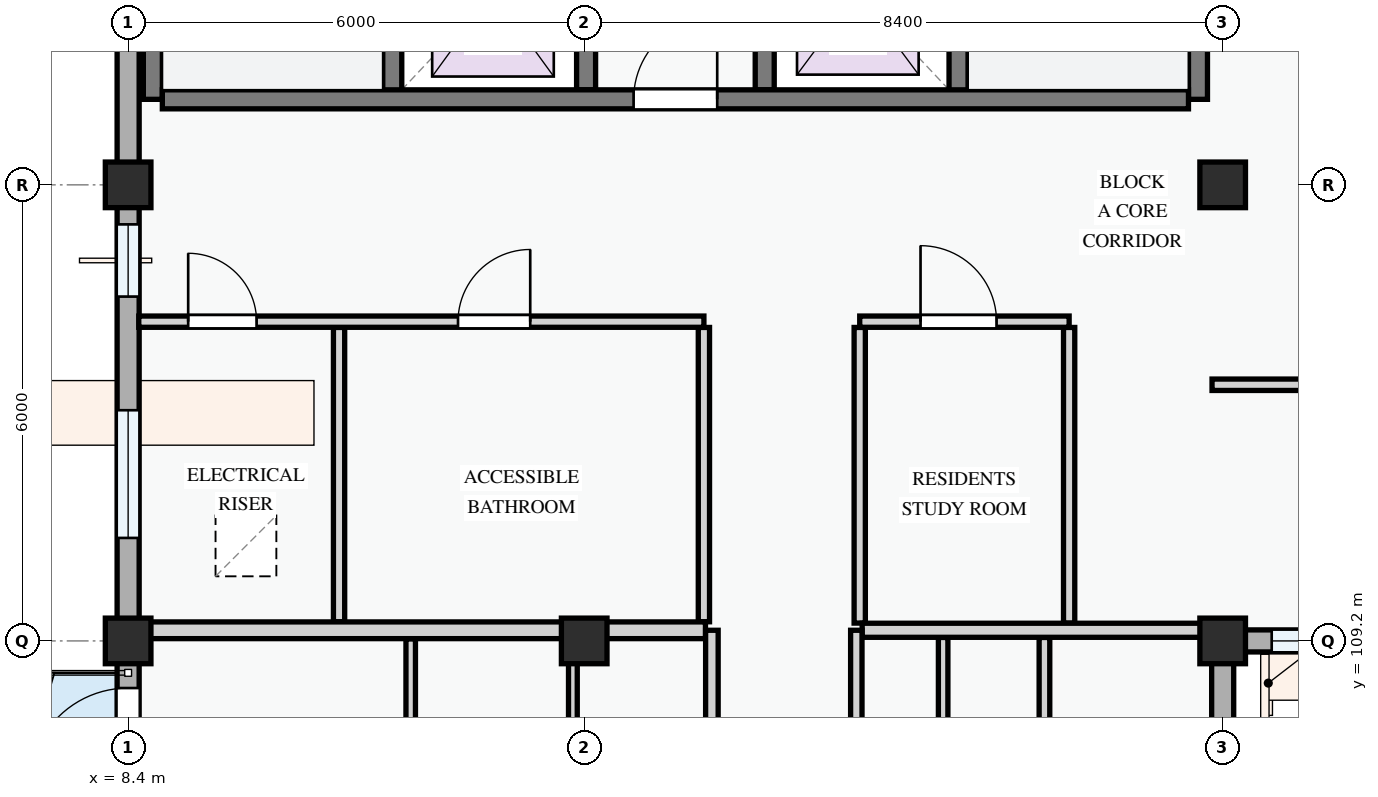
"""IFC4 building model, lengths in metres.
Left out: names, types, materials, properties, quantities, classifications, styles, units other than length and angle.
Written with IfcOpenShell. Run it as: python <this file> out.ifc"""

import sys

from ifc_helpers import new_model, si_unit, direction, frame, frame_2d, origin, origin_2d, place, context, subcontext, project, spatial, rectangle, extrude, element, fill, save


model = new_model("IFC4")
c1 = context("Model", 3, precision=1e-05, world=origin(), true_north=direction((0.0, 1.0)))
c2 = subcontext(c1, "Body", "Model", "MODEL_VIEW")
j1 = project(units=[si_unit("LENGTHUNIT", "METRE"), si_unit("PLANEANGLEUNIT", "RADIAN")], contexts=[c1])
p1 = place(None, origin())
s1 = spatial("IfcSite", under=j1, at=p1, CompositionType="ELEMENT")
p2 = place(p1, origin())
s2 = spatial("IfcBuilding", under=s1, at=p2, CompositionType="ELEMENT")
p3 = place(p2, frame((0.0, 0.0, 27.9)))
s3 = spatial("IfcBuildingStorey", under=s2, at=p3, CompositionType="ELEMENT", Elevation=27.9)
for number, where, z_axis, x_axis in (
    (1, (8.4, 109.2, 0.0), (0.0, 0.0, 1.0), (1.0, 0.0, 0.0)),
    (2, (8.4, 115.2, 0.0), (0.0, 0.0, 1.0), (1.0, 0.0, 0.0)),
    (3, (14.4, 109.2, 0.0), (0.0, 0.0, 1.0), (1.0, 0.0, 0.0)),
    (4, (22.8, 109.2, 0.0), (0.0, 0.0, 1.0), (1.0, 0.0, 0.0)),
    (5, (22.8, 115.2, 0.0), (0.0, 0.0, 1.0), (1.0, 0.0, 0.0)),
):
    element("IfcColumn", number, at=place(p3, frame(where, z_axis=z_axis, x_axis=x_axis)), inside=s3, PredefinedType="COLUMN", context=c2, shape_type="SweptSolid", body=[
        extrude(rectangle(XDim=0.6, YDim=0.6, at=origin_2d()), origin(), (0.0, 0.0, 1.0), 3.3),
    ])
p4 = place(p3, frame((22.8, 109.2, 0.0), z_axis=(0.0, 0.0, 1.0), x_axis=(1.0, 0.0, 0.0)))
e6 = element("IfcWall", 6, at=p4, inside=s3, PredefinedType="STANDARD", context=c2, shape_type="SweptSolid", body=[
    extrude(rectangle(XDim=6.0, YDim=0.29, at=frame_2d((3.0, 0.0))), origin(), (0.0, 0.0, 1.0), 2.475),
])
p5 = place(p4, frame((0.645, 0.0, 0.78)))
e7 = element("IfcOpeningElement", 7, at=p5, cuts=e6, PredefinedType="OPENING", context=c2, shape_type="SweptSolid", body=[
    extrude(rectangle(XDim=1.25, YDim=1.45, at=frame_2d((0.625, 0.725))), frame((0.0, 0.155, 0.0), z_axis=(0.0, -1.0, 0.0), x_axis=(1.0, 0.0, 0.0)), (0.0, 0.0, 1.0), 0.31),
])
p6 = place(p4, frame((2.905, 0.0, 0.78)))
e8 = element("IfcOpeningElement", 8, at=p6, cuts=e6, PredefinedType="OPENING", context=c2, shape_type="SweptSolid", body=[
    extrude(rectangle(XDim=2.35, YDim=1.55, at=frame_2d((1.175, 0.775))), frame((0.0, 0.155, 0.0), z_axis=(0.0, -1.0, 0.0), x_axis=(1.0, 0.0, 0.0)), (0.0, 0.0, 1.0), 0.31),
])
p7 = place(p3, frame((8.4, 123.6, 0.0), z_axis=(0.0, 0.0, 1.0), x_axis=(0.0, -1.0, 0.0)))
e9 = element("IfcWall", 9, at=p7, inside=s3, PredefinedType="STANDARD", context=c2, shape_type="SweptSolid", body=[
    extrude(rectangle(XDim=8.4, YDim=0.29, at=frame_2d((4.2, 0.0))), origin(), (0.0, 0.0, 1.0), 2.345),
])
p8 = place(p7, frame((1.546, 0.0, 0.78)))
e10 = element("IfcOpeningElement", 10, at=p8, cuts=e9, PredefinedType="OPENING", context=c2, shape_type="SweptSolid", body=[
    extrude(rectangle(XDim=0.9, YDim=1.2, at=frame_2d((0.45, 0.6))), frame((0.0, 0.155, 0.0), z_axis=(0.0, -1.0, 0.0), x_axis=(1.0, 0.0, 0.0)), (0.0, 0.0, 1.0), 0.31),
])
p9 = place(p7, frame((4.594, 0.0, 0.78)))
e11 = element("IfcOpeningElement", 11, at=p9, cuts=e9, PredefinedType="OPENING", context=c2, shape_type="SweptSolid", body=[
    extrude(rectangle(XDim=1.75, YDim=1.45, at=frame_2d((0.875, 0.725))), frame((0.0, 0.155, 0.0), z_axis=(0.0, -1.0, 0.0), x_axis=(1.0, 0.0, 0.0)), (0.0, 0.0, 1.0), 0.31),
])
p10 = place(p3, frame((8.4, 115.2, 0.0), z_axis=(0.0, 0.0, 1.0), x_axis=(0.0, -1.0, 0.0)))
e12 = element("IfcWall", 12, at=p10, inside=s3, PredefinedType="STANDARD", context=c2, shape_type="SweptSolid", body=[
    extrude(rectangle(XDim=6.0, YDim=0.29, at=frame_2d((3.0, 0.0))), origin(), (0.0, 0.0, 1.0), 2.445),
])
p11 = place(p10, frame((0.52, 0.0, 0.78)))
e13 = element("IfcOpeningElement", 13, at=p11, cuts=e12, PredefinedType="OPENING", context=c2, shape_type="SweptSolid", body=[
    extrude(rectangle(XDim=0.95, YDim=1.15, at=frame_2d((0.475, 0.575))), frame((0.0, 0.155, 0.0), z_axis=(0.0, -1.0, 0.0), x_axis=(1.0, 0.0, 0.0)), (0.0, 0.0, 1.0), 0.31),
])
p12 = place(p10, frame((2.965, 0.0, 0.78)))
e14 = element("IfcOpeningElement", 14, at=p12, cuts=e12, PredefinedType="OPENING", context=c2, shape_type="SweptSolid", body=[
    extrude(rectangle(XDim=1.68, YDim=1.46, at=frame_2d((0.84, 0.73))), frame((0.0, 0.155, 0.0), z_axis=(0.0, -1.0, 0.0), x_axis=(1.0, 0.0, 0.0)), (0.0, 0.0, 1.0), 0.31),
])
p13 = place(p3, frame((8.4, 109.2, 0.0), z_axis=(0.0, 0.0, 1.0), x_axis=(0.0, -1.0, 0.0)))
e15 = element("IfcWall", 15, at=p13, inside=s3, PredefinedType="STANDARD", context=c2, shape_type="SweptSolid", body=[
    extrude(rectangle(XDim=8.4, YDim=0.29, at=frame_2d((4.2, 0.0))), origin(), (0.0, 0.0, 1.0), 2.345),
])
p14 = place(p13, frame((0.62, 0.0, 0.0)))
e16 = element("IfcOpeningElement", 16, at=p14, cuts=e15, PredefinedType="OPENING", context=c2, shape_type="SweptSolid", body=[
    extrude(rectangle(XDim=1.3, YDim=2.15, at=frame_2d((0.65, 1.075))), frame((0.0, 0.155, 0.0), z_axis=(0.0, -1.0, 0.0), x_axis=(1.0, 0.0, 0.0)), (0.0, 0.0, 1.0), 0.31),
])
p15 = place(p13, frame((3.587, 0.0, 0.78)))
e17 = element("IfcOpeningElement", 17, at=p15, cuts=e15, PredefinedType="OPENING", context=c2, shape_type="SweptSolid", body=[
    extrude(rectangle(XDim=1.05, YDim=1.2, at=frame_2d((0.525, 0.6))), frame((0.0, 0.155, 0.0), z_axis=(0.0, -1.0, 0.0), x_axis=(1.0, 0.0, 0.0)), (0.0, 0.0, 1.0), 0.31),
])
p16 = place(p13, frame((6.732, 0.0, 0.78)))
e18 = element("IfcOpeningElement", 18, at=p16, cuts=e15, PredefinedType="OPENING", context=c2, shape_type="SweptSolid", body=[
    extrude(rectangle(XDim=1.0, YDim=1.25, at=frame_2d((0.5, 0.625))), frame((0.0, 0.155, 0.0), z_axis=(0.0, -1.0, 0.0), x_axis=(1.0, 0.0, 0.0)), (0.0, 0.0, 1.0), 0.31),
])
p17 = place(p3, frame((22.8, 100.8, 0.0), z_axis=(0.0, 0.0, 1.0), x_axis=(0.0, 1.0, 0.0)))
e19 = element("IfcWall", 19, at=p17, inside=s3, PredefinedType="STANDARD", context=c2, shape_type="SweptSolid", body=[
    extrude(rectangle(XDim=8.4, YDim=0.29, at=frame_2d((4.2, 0.0))), origin(), (0.0, 0.0, 1.0), 2.425),
])
p18 = place(p17, frame((0.515, 0.0, 0.78)))
e20 = element("IfcOpeningElement", 20, at=p18, cuts=e19, PredefinedType="OPENING", context=c2, shape_type="SweptSolid", body=[
    extrude(rectangle(XDim=1.05, YDim=1.2, at=frame_2d((0.525, 0.6))), frame((0.0, 0.155, 0.0), z_axis=(0.0, -1.0, 0.0), x_axis=(1.0, 0.0, 0.0)), (0.0, 0.0, 1.0), 0.31),
])
p19 = place(p17, frame((3.029, 0.0, 0.78)))
e21 = element("IfcOpeningElement", 21, at=p19, cuts=e19, PredefinedType="OPENING", context=c2, shape_type="SweptSolid", body=[
    extrude(rectangle(XDim=0.95, YDim=1.15, at=frame_2d((0.475, 0.575))), frame((0.0, 0.155, 0.0), z_axis=(0.0, -1.0, 0.0), x_axis=(1.0, 0.0, 0.0)), (0.0, 0.0, 1.0), 0.31),
])
p20 = place(p17, frame((5.885, 0.0, 0.78)))
e22 = element("IfcOpeningElement", 22, at=p20, cuts=e19, PredefinedType="OPENING", context=c2, shape_type="SweptSolid", body=[
    extrude(rectangle(XDim=1.42, YDim=1.38, at=frame_2d((0.71, 0.69))), frame((0.0, 0.155, 0.0), z_axis=(0.0, -1.0, 0.0), x_axis=(1.0, 0.0, 0.0)), (0.0, 0.0, 1.0), 0.31),
])
p21 = place(p3, frame((11.875, 123.25, 0.0), z_axis=(0.0, 0.0, 1.0), x_axis=(0.0, -1.0, 0.0)))
e23 = element("IfcWall", 23, at=p21, inside=s3, PredefinedType="SHEAR", context=c2, shape_type="SweptSolid", body=[
    extrude(rectangle(XDim=6.925, YDim=0.25, at=frame_2d((3.462, 0.0))), origin(), (0.0, 0.0, 1.0), 3.0),
])
p22 = place(p21, frame((0.35, 0.0, 0.0)))
e24 = element("IfcOpeningElement", 24, at=p22, cuts=e23, PredefinedType="OPENING", context=c2, shape_type="SweptSolid", body=[
    extrude(rectangle(XDim=0.95, YDim=2.1, at=frame_2d((0.475, 1.05))), frame((0.0, 0.135, 0.0), z_axis=(0.0, -1.0, 0.0), x_axis=(1.0, 0.0, 0.0)), (0.0, 0.0, 1.0), 0.27),
])
p23 = place(p3, frame((8.725, 123.4, 0.0), z_axis=(0.0, 0.0, 1.0), x_axis=(0.0, -1.0, 0.0)))
e25 = element("IfcWall", 25, at=p23, inside=s3, PredefinedType="SHEAR", context=c2, shape_type="SweptSolid", body=[
    extrude(rectangle(XDim=7.075, YDim=0.25, at=frame_2d((3.538, 0.0))), origin(), (0.0, 0.0, 1.0), 3.0),
])
p24 = place(p3, frame((22.475, 123.25, 0.0), z_axis=(0.0, 0.0, 1.0), x_axis=(0.0, -1.0, 0.0)))
e26 = element("IfcWall", 26, at=p24, inside=s3, PredefinedType="SHEAR", context=c2, shape_type="SweptSolid", body=[
    extrude(rectangle(XDim=6.925, YDim=0.25, at=frame_2d((3.462, 0.0))), origin(), (0.0, 0.0, 1.0), 3.0),
])
p25 = place(p3, frame((19.325, 123.25, 0.0), z_axis=(0.0, 0.0, 1.0), x_axis=(0.0, -1.0, 0.0)))
e27 = element("IfcWall", 27, at=p25, inside=s3, PredefinedType="SHEAR", context=c2, shape_type="SweptSolid", body=[
    extrude(rectangle(XDim=6.925, YDim=0.25, at=frame_2d((3.462, 0.0))), origin(), (0.0, 0.0, 1.0), 3.0),
])
p26 = place(p25, frame((0.35, 0.0, 0.0)))
e28 = element("IfcOpeningElement", 28, at=p26, cuts=e27, PredefinedType="OPENING", context=c2, shape_type="SweptSolid", body=[
    extrude(rectangle(XDim=0.95, YDim=2.1, at=frame_2d((0.475, 1.05))), frame((0.0, 0.135, 0.0), z_axis=(0.0, -1.0, 0.0), x_axis=(1.0, 0.0, 0.0)), (0.0, 0.0, 1.0), 0.27),
])
for number, where, z_axis, x_axis in (
    (29, (14.425, 118.875, 0.0), (0.0, 0.0, 1.0), (0.0, -1.0, 0.0)),
    (30, (16.775, 118.875, 0.0), (0.0, 0.0, 1.0), (0.0, -1.0, 0.0)),
):
    element("IfcWall", number, at=place(p3, frame(where, z_axis=z_axis, x_axis=x_axis)), inside=s3, PredefinedType="SHEAR", context=c2, shape_type="SweptSolid", body=[
        extrude(rectangle(XDim=2.425, YDim=0.25, at=frame_2d((1.212, 0.0))), origin(), (0.0, 0.0, 1.0), 3.0),
    ])
p27 = place(p3, frame((8.85, 116.325, 0.0), z_axis=(0.0, 0.0, 1.0), x_axis=(1.0, 0.0, 0.0)))
e31 = element("IfcWall", 31, at=p27, inside=s3, PredefinedType="SHEAR", context=c2, shape_type="SweptSolid", body=[
    extrude(rectangle(XDim=13.5, YDim=0.25, at=frame_2d((6.75, 0.0))), origin(), (0.0, 0.0, 1.0), 3.0),
])
p28 = place(p27, frame((6.2, 0.0, 0.0)))
e32 = element("IfcOpeningElement", 32, at=p28, cuts=e31, PredefinedType="OPENING", context=c2, shape_type="SweptSolid", body=[
    extrude(rectangle(XDim=1.1, YDim=2.15, at=frame_2d((0.55, 1.075))), frame((0.0, 0.135, 0.0), z_axis=(0.0, -1.0, 0.0), x_axis=(1.0, 0.0, 0.0)), (0.0, 0.0, 1.0), 0.27),
])
for number, where, z_axis, x_axis in (
    (33, (11.175, 113.324, 0.0), (0.0, 0.0, 1.0), (0.0, -1.0, 0.0)),
    (34, (15.975, 113.324, 0.0), (0.0, 0.0, 1.0), (0.0, -1.0, 0.0)),
):
    element("IfcWall", number, at=place(p3, frame(where, z_axis=z_axis, x_axis=x_axis)), inside=s3, PredefinedType="PARTITIONING", context=c2, shape_type="SweptSolid", body=[
        extrude(rectangle(XDim=3.872, YDim=0.148, at=frame_2d((1.936, 0.0))), origin(), (0.0, 0.0, 1.0), 3.0),
    ])
for number, where, z_axis, x_axis in (
    (35, (18.025, 113.324, 0.0), (0.0, 0.0, 1.0), (0.0, -1.0, 0.0)),
    (36, (20.78, 113.324, 0.0), (0.0, 0.0, 1.0), (0.0, -1.0, 0.0)),
):
    element("IfcWall", number, at=place(p3, frame(where, z_axis=z_axis, x_axis=x_axis)), inside=s3, PredefinedType="PARTITIONING", context=c2, shape_type="SweptSolid", body=[
        extrude(rectangle(XDim=3.889, YDim=0.148, at=frame_2d((1.945, 0.0))), origin(), (0.0, 0.0, 1.0), 3.0),
    ])
p29 = place(p3, frame((8.54, 113.4, 0.0), z_axis=(0.0, 0.0, 1.0), x_axis=(1.0, 0.0, 0.0)))
e37 = element("IfcWall", 37, at=p29, inside=s3, PredefinedType="PARTITIONING", context=c2, shape_type="SweptSolid", body=[
    extrude(rectangle(XDim=7.435, YDim=0.148, at=frame_2d((3.718, 0.0))), origin(), (0.0, 0.0, 1.0), 3.0),
])
p30 = place(p29, frame((0.65, 0.0, 0.0)))
e38 = element("IfcOpeningElement", 38, at=p30, cuts=e37, PredefinedType="OPENING", context=c2, shape_type="SweptSolid", body=[
    extrude(rectangle(XDim=0.9, YDim=2.1, at=frame_2d((0.45, 1.05))), frame((0.0, 0.084, 0.0), z_axis=(0.0, -1.0, 0.0), x_axis=(1.0, 0.0, 0.0)), (0.0, 0.0, 1.0), 0.168),
])
p31 = place(p29, frame((4.2, 0.0, 0.0)))
e39 = element("IfcOpeningElement", 39, at=p31, cuts=e37, PredefinedType="OPENING", context=c2, shape_type="SweptSolid", body=[
    extrude(rectangle(XDim=0.95, YDim=2.1, at=frame_2d((0.475, 1.05))), frame((0.0, 0.084, 0.0), z_axis=(0.0, -1.0, 0.0), x_axis=(1.0, 0.0, 0.0)), (0.0, 0.0, 1.0), 0.168),
])
p32 = place(p3, frame((18.025, 113.4, 0.0), z_axis=(0.0, 0.0, 1.0), x_axis=(1.0, 0.0, 0.0)))
e40 = element("IfcWall", 40, at=p32, inside=s3, PredefinedType="PARTITIONING", context=c2, shape_type="SweptSolid", body=[
    extrude(rectangle(XDim=2.755, YDim=0.148, at=frame_2d((1.377, 0.0))), origin(), (0.0, 0.0, 1.0), 3.0),
])
p33 = place(p32, frame((0.8, 0.0, 0.0)))
e41 = element("IfcOpeningElement", 41, at=p33, cuts=e40, PredefinedType="OPENING", context=c2, shape_type="SweptSolid", body=[
    extrude(rectangle(XDim=1.0, YDim=2.15, at=frame_2d((0.5, 1.075))), frame((0.0, 0.084, 0.0), z_axis=(0.0, -1.0, 0.0), x_axis=(1.0, 0.0, 0.0)), (0.0, 0.0, 1.0), 0.168),
])
p34 = place(p3, frame((22.66, 112.57, 0.0), z_axis=(0.0, 0.0, 1.0), x_axis=(1.0, 0.0, 0.0)))
e42 = element("IfcWall", 42, at=p34, inside=s3, PredefinedType="PARTITIONING", context=c2, shape_type="SweptSolid", body=[
    extrude(rectangle(XDim=2.406, YDim=0.15, at=frame_2d((1.203, 0.0))), origin(), (0.0, 0.0, 1.0), 3.0),
])
p35 = place(p3, frame((12.118, 103.017, 0.0), z_axis=(0.0, 0.0, 1.0), x_axis=(0.0, 1.0, 0.0)))
e43 = element("IfcWall", 43, at=p35, inside=s3, PredefinedType="PARTITIONING", context=c2, shape_type="SweptSolid", body=[
    extrude(rectangle(XDim=6.211, YDim=0.125, at=frame_2d((3.105, 0.0))), origin(), (0.0, 0.0, 1.0), 3.0),
])
p36 = place(p3, frame((14.251, 103.017, 0.0), z_axis=(0.0, 0.0, 1.0), x_axis=(0.0, 1.0, 0.0)))
e44 = element("IfcWall", 44, at=p36, inside=s3, PredefinedType="PARTITIONING", context=c2, shape_type="SweptSolid", body=[
    extrude(rectangle(XDim=6.211, YDim=0.115, at=frame_2d((3.105, 0.0))), origin(), (0.0, 0.0, 1.0), 2.425),
])
p37 = place(p3, frame((20.455, 102.741, 0.0), z_axis=(0.0, 0.0, 1.0), x_axis=(0.0, 1.0, 0.0)))
e45 = element("IfcWall", 45, at=p37, inside=s3, PredefinedType="PARTITIONING", context=c2, shape_type="SweptSolid", body=[
    extrude(rectangle(XDim=6.504, YDim=0.14, at=frame_2d((3.252, 0.0))), origin(), (0.0, 0.0, 1.0), 3.0),
])
p38 = place(p3, frame((19.122, 102.741, 0.0), z_axis=(0.0, 0.0, 1.0), x_axis=(0.0, 1.0, 0.0)))
e46 = element("IfcWall", 46, at=p38, inside=s3, PredefinedType="PARTITIONING", context=c2, shape_type="SweptSolid", body=[
    extrude(rectangle(XDim=6.504, YDim=0.125, at=frame_2d((3.252, 0.0))), origin(), (0.0, 0.0, 1.0), 3.0),
])
p39 = place(p3, frame((8.547, 109.34, 0.0), z_axis=(0.0, 0.0, 1.0), x_axis=(1.0, 0.0, 0.0)))
e47 = element("IfcWall", 47, at=p39, inside=s3, PredefinedType="PARTITIONING", context=c2, shape_type="SweptSolid", body=[
    extrude(rectangle(XDim=7.448, YDim=0.22, at=frame_2d((3.724, 0.0))), origin(), (0.0, 0.0, 1.0), 2.375),
])
p40 = place(p3, frame((18.057, 109.34, 0.0), z_axis=(0.0, 0.0, 1.0), x_axis=(1.0, 0.0, 0.0)))
e48 = element("IfcWall", 48, at=p40, inside=s3, PredefinedType="PARTITIONING", context=c2, shape_type="SweptSolid", body=[
    extrude(rectangle(XDim=4.683, YDim=0.185, at=frame_2d((2.342, 0.0))), origin(), (0.0, 0.0, 1.0), 2.375),
])
p41 = place(p3, frame((16.08, 86.547, 0.0), z_axis=(0.0, 0.0, 1.0), x_axis=(0.0, 1.0, 0.0)))
e49 = element("IfcWall", 49, at=p41, inside=s3, PredefinedType="PARTITIONING", context=c2, shape_type="SweptSolid", body=[
    extrude(rectangle(XDim=22.793, YDim=0.165, at=frame_2d((11.396, 0.0))), origin(), (0.0, 0.0, 1.0), 3.0),
])
p42 = place(p41, frame((3.524, 0.0, 0.0)))
e50 = element("IfcOpeningElement", 50, at=p42, cuts=e49, PredefinedType="OPENING", context=c2, shape_type="SweptSolid", body=[
    extrude(rectangle(XDim=0.92, YDim=2.1, at=frame_2d((0.46, 1.05))), frame((0.0, 0.093, 0.0), z_axis=(0.0, -1.0, 0.0), x_axis=(1.0, 0.0, 0.0)), (0.0, 0.0, 1.0), 0.185),
])
p43 = place(p41, frame((10.716, 0.0, 0.0)))
e51 = element("IfcOpeningElement", 51, at=p43, cuts=e49, PredefinedType="OPENING", context=c2, shape_type="SweptSolid", body=[
    extrude(rectangle(XDim=0.92, YDim=2.1, at=frame_2d((0.46, 1.05))), frame((0.0, 0.093, 0.0), z_axis=(0.0, -1.0, 0.0), x_axis=(1.0, 0.0, 0.0)), (0.0, 0.0, 1.0), 0.185),
])
p44 = place(p3, frame((17.98, 86.547, 0.0), z_axis=(0.0, 0.0, 1.0), x_axis=(0.0, 1.0, 0.0)))
e52 = element("IfcWall", 52, at=p44, inside=s3, PredefinedType="PARTITIONING", context=c2, shape_type="SweptSolid", body=[
    extrude(rectangle(XDim=22.793, YDim=0.15, at=frame_2d((11.396, 0.0))), origin(), (0.0, 0.0, 1.0), 3.0),
])
p45 = place(p44, frame((3.546, 0.0, 0.0)))
e53 = element("IfcOpeningElement", 53, at=p45, cuts=e52, PredefinedType="OPENING", context=c2, shape_type="SweptSolid", body=[
    extrude(rectangle(XDim=0.92, YDim=2.1, at=frame_2d((0.46, 1.05))), frame((0.0, 0.085, 0.0), z_axis=(0.0, -1.0, 0.0), x_axis=(1.0, 0.0, 0.0)), (0.0, 0.0, 1.0), 0.17),
])
p46 = place(p44, frame((10.838, 0.0, 0.0)))
e54 = element("IfcOpeningElement", 54, at=p46, cuts=e52, PredefinedType="OPENING", context=c2, shape_type="SweptSolid", body=[
    extrude(rectangle(XDim=0.92, YDim=2.1, at=frame_2d((0.46, 1.05))), frame((0.0, 0.085, 0.0), z_axis=(0.0, -1.0, 0.0), x_axis=(1.0, 0.0, 0.0)), (0.0, 0.0, 1.0), 0.17),
])
p47 = place(p5, origin())
e55 = element("IfcWindow", 55, at=p47, inside=s3, PartitioningType="SINGLE_PANEL", PredefinedType="WINDOW", context=c2, shape_type="SweptSolid", body=[
    extrude(rectangle(XDim=1.25, YDim=1.45, at=frame_2d((0.625, 0.725))), frame((0.0, 0.03, 0.0), z_axis=(0.0, -1.0, 0.0), x_axis=(1.0, 0.0, 0.0)), (0.0, 0.0, 1.0), 0.06),
])
fill(e7, e55)
p48 = place(p11, origin())
e56 = element("IfcWindow", 56, at=p48, inside=s3, PartitioningType="SINGLE_PANEL", PredefinedType="WINDOW", context=c2, shape_type="SweptSolid", body=[
    extrude(rectangle(XDim=0.95, YDim=1.15, at=frame_2d((0.475, 0.575))), frame((0.0, 0.03, 0.0), z_axis=(0.0, -1.0, 0.0), x_axis=(1.0, 0.0, 0.0)), (0.0, 0.0, 1.0), 0.06),
])
fill(e13, e56)
p49 = place(p12, origin())
e57 = element("IfcWindow", 57, at=p49, inside=s3, PartitioningType="DOUBLE_PANEL_VERTICAL", PredefinedType="WINDOW", context=c2, shape_type="SweptSolid", body=[
    extrude(rectangle(XDim=1.68, YDim=1.46, at=frame_2d((0.84, 0.73))), frame((0.0, 0.03, 0.0), z_axis=(0.0, -1.0, 0.0), x_axis=(1.0, 0.0, 0.0)), (0.0, 0.0, 1.0), 0.06),
])
fill(e14, e57)
p50 = place(p14, frame((1.3, 0.0, 0.0), z_axis=(0.0, 0.0, 1.0), x_axis=(-1.0, 0.0, 0.0)))
e58 = element("IfcDoor", 58, at=p50, inside=s3, OperationType="SINGLE_SWING_LEFT", PredefinedType="DOOR", context=c2, shape_type="SweptSolid", body=[
    extrude(rectangle(XDim=1.3, YDim=2.15, at=frame_2d((0.65, 1.075))), frame((0.0, 0.025, 0.0), z_axis=(0.0, -1.0, 0.0), x_axis=(1.0, 0.0, 0.0)), (0.0, 0.0, 1.0), 0.05),
])
fill(e16, e58)
p51 = place(p28, origin())
e59 = element("IfcDoor", 59, at=p51, inside=s3, OperationType="SINGLE_SWING_RIGHT", PredefinedType="DOOR", context=c2, shape_type="SweptSolid", body=[
    extrude(rectangle(XDim=1.1, YDim=2.15, at=frame_2d((0.55, 1.075))), frame((0.0, 0.025, 0.0), z_axis=(0.0, -1.0, 0.0), x_axis=(1.0, 0.0, 0.0)), (0.0, 0.0, 1.0), 0.05),
])
fill(e32, e59)
p52 = place(p30, origin())
e60 = element("IfcDoor", 60, at=p52, inside=s3, OperationType="SINGLE_SWING_LEFT", PredefinedType="DOOR", context=c2, shape_type="SweptSolid", body=[
    extrude(rectangle(XDim=0.9, YDim=2.1, at=frame_2d((0.45, 1.05))), frame((0.0, 0.025, 0.0), z_axis=(0.0, -1.0, 0.0), x_axis=(1.0, 0.0, 0.0)), (0.0, 0.0, 1.0), 0.05),
])
fill(e38, e60)
p53 = place(p31, origin())
e61 = element("IfcDoor", 61, at=p53, inside=s3, OperationType="SINGLE_SWING_RIGHT", PredefinedType="DOOR", context=c2, shape_type="SweptSolid", body=[
    extrude(rectangle(XDim=0.95, YDim=2.1, at=frame_2d((0.475, 1.05))), frame((0.0, 0.025, 0.0), z_axis=(0.0, -1.0, 0.0), x_axis=(1.0, 0.0, 0.0)), (0.0, 0.0, 1.0), 0.05),
])
fill(e39, e61)
p54 = place(p33, origin())
e62 = element("IfcDoor", 62, at=p54, inside=s3, OperationType="SINGLE_SWING_LEFT", PredefinedType="DOOR", context=c2, shape_type="SweptSolid", body=[
    extrude(rectangle(XDim=1.0, YDim=2.15, at=frame_2d((0.5, 1.075))), frame((0.0, 0.025, 0.0), z_axis=(0.0, -1.0, 0.0), x_axis=(1.0, 0.0, 0.0)), (0.0, 0.0, 1.0), 0.05),
])
fill(e41, e62)
save(model, sys.argv[1])
